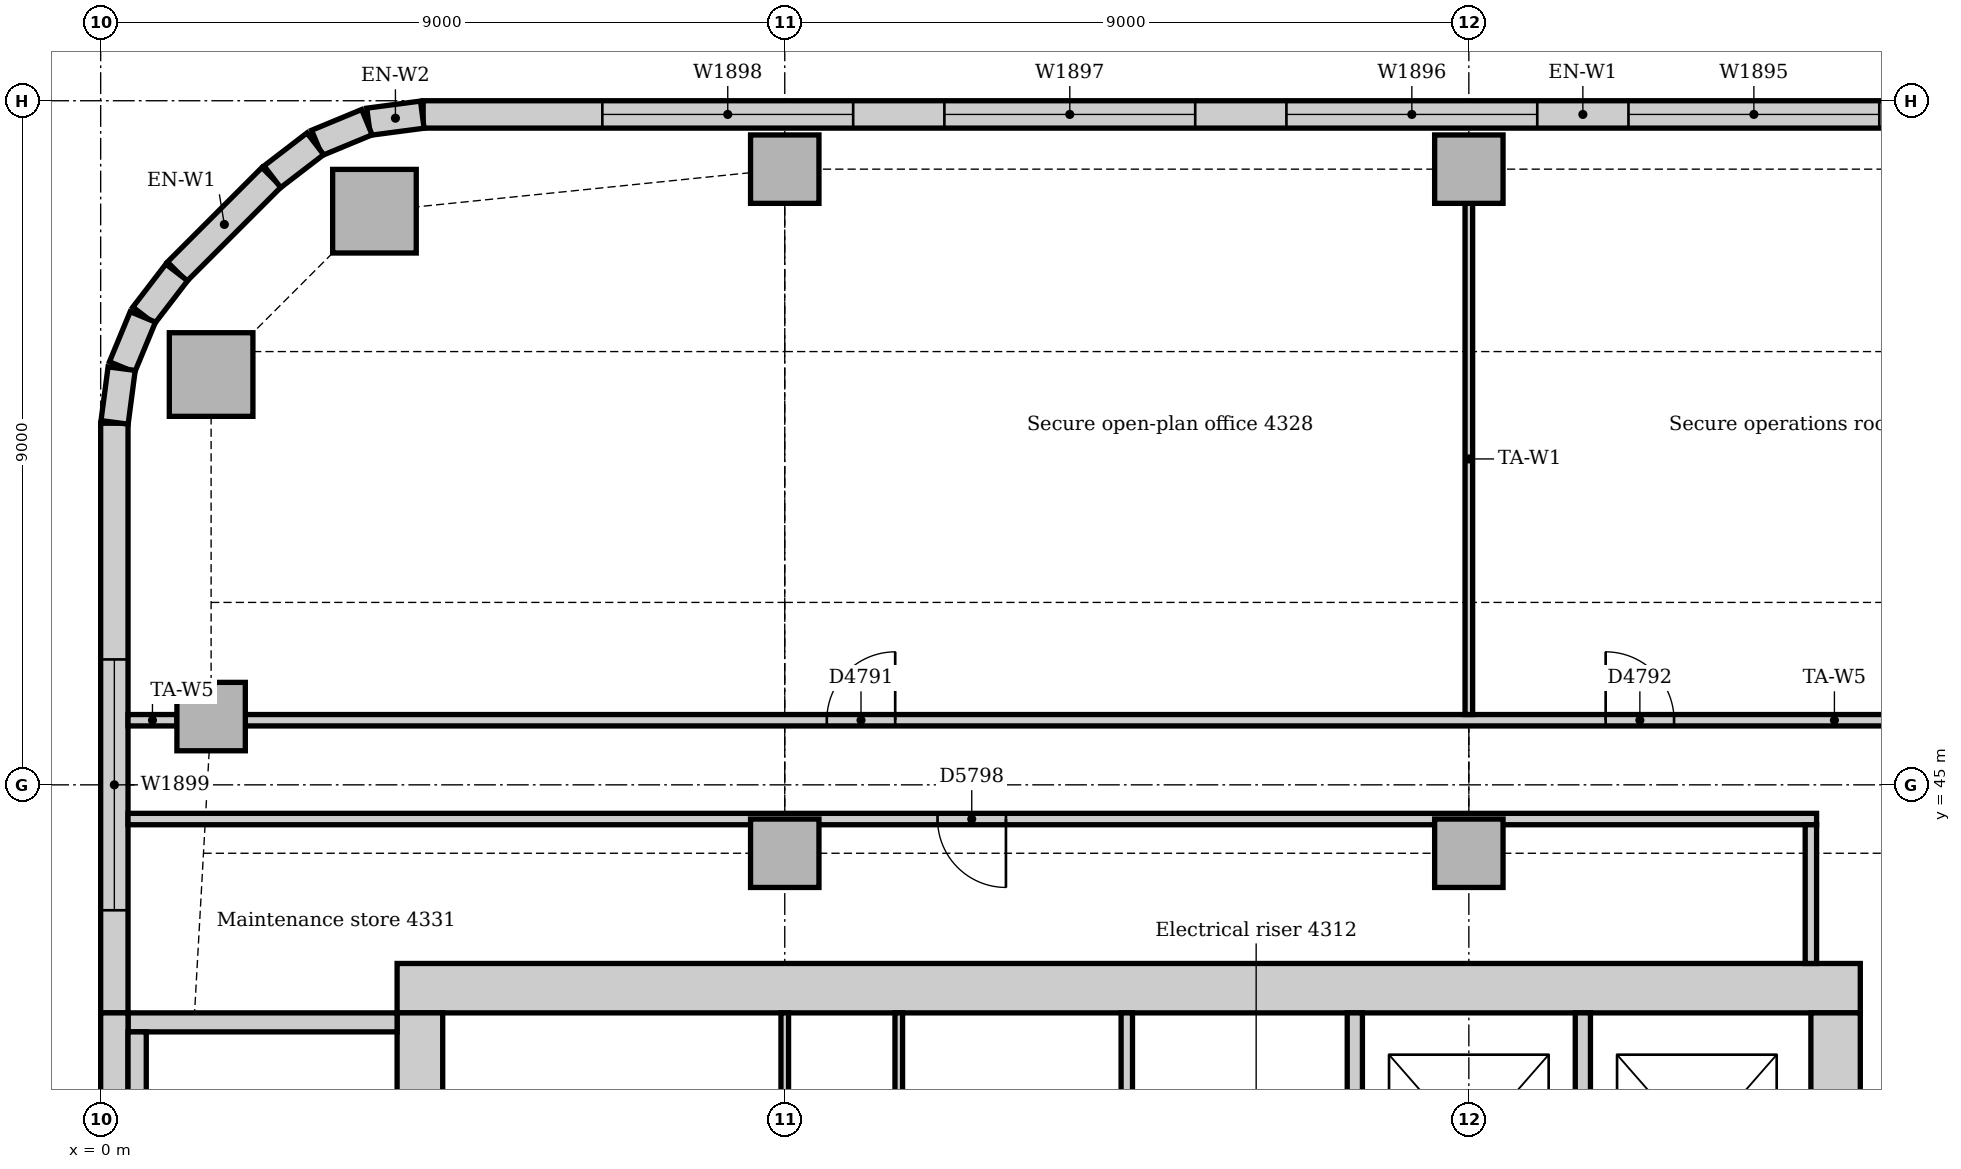
"""IFC4 building model, lengths in metres.
Left out: names, types, materials, properties, quantities, classifications, styles, units other than length and angle.
Written with IfcOpenShell. Run it as: python <this file> out.ifc"""

import sys

from ifc_helpers import new_model, si_unit, direction, frame, frame_2d, origin, origin_2d, place, context, subcontext, project, spatial, rectangle, extrude, element, fill, save


model = new_model("IFC4")
c1 = context("Model", 3, precision=1e-05, world=origin(), true_north=direction((0.0, 1.0)))
c2 = subcontext(c1, "Body", "Model", "MODEL_VIEW")
j1 = project(units=[si_unit("LENGTHUNIT", "METRE"), si_unit("PLANEANGLEUNIT", "RADIAN")], contexts=[c1])
p1 = place(None, origin())
s1 = spatial("IfcSite", under=j1, at=p1, CompositionType="ELEMENT")
p2 = place(p1, origin())
s2 = spatial("IfcBuilding", under=s1, at=p2, CompositionType="ELEMENT")
p3 = place(p2, frame((0.0, 0.0, 181.0)))
s3 = spatial("IfcBuildingStorey", under=s2, at=p3, CompositionType="ELEMENT", Elevation=181.0)
p4 = place(p3, frame((23.15, 42.325, 0.0), z_axis=(0.0, 0.0, 1.0), x_axis=(-1.0, 0.0, 0.0)))
e1 = element("IfcWall", 1, at=p4, inside=s3, PredefinedType="SOLIDWALL", context=c2, shape_type="SweptSolid", body=[
    extrude(rectangle(XDim=19.25, YDim=0.65, at=frame_2d((9.625, 0.0))), origin(), (0.0, 0.0, 1.0), 4.0),
])
p5 = place(p3, frame((22.825, 31.5, 0.0), z_axis=(0.0, 0.0, 1.0), x_axis=(0.0, 1.0, 0.0)))
e2 = element("IfcWall", 2, at=p5, inside=s3, PredefinedType="SOLIDWALL", context=c2, shape_type="SweptSolid", body=[
    extrude(rectangle(XDim=10.5, YDim=0.65, at=frame_2d((5.25, 0.0))), origin(), (0.0, 0.0, 1.0), 4.0),
])
p6 = place(p5, frame((3.15, 0.0, 0.0)))
e3 = element("IfcOpeningElement", 3, at=p6, cuts=e2, PredefinedType="OPENING", context=c2, shape_type="SweptSolid", body=[
    extrude(rectangle(XDim=1.0, YDim=2.1, at=frame_2d((0.5, 1.05))), frame((0.0, 0.335, 0.0), z_axis=(0.0, -1.0, 0.0), x_axis=(1.0, 0.0, 0.0)), (0.0, 0.0, 1.0), 0.67),
])
p7 = place(p5, frame((5.2, 0.0, 0.0)))
e4 = element("IfcOpeningElement", 4, at=p7, cuts=e2, PredefinedType="OPENING", context=c2, shape_type="SweptSolid", body=[
    extrude(rectangle(XDim=1.0, YDim=2.1, at=frame_2d((0.5, 1.05))), frame((0.0, 0.335, 0.0), z_axis=(0.0, -1.0, 0.0), x_axis=(1.0, 0.0, 0.0)), (0.0, 0.0, 1.0), 0.67),
])
p8 = place(p3, frame((4.2, 42.0, 0.0), z_axis=(0.0, 0.0, 1.0), x_axis=(0.0, -1.0, 0.0)))
e5 = element("IfcWall", 5, at=p8, inside=s3, PredefinedType="SOLIDWALL", context=c2, shape_type="SweptSolid", body=[
    extrude(rectangle(XDim=10.5, YDim=0.6, at=frame_2d((5.25, 0.0))), origin(), (0.0, 0.0, 1.0), 4.0),
])
p9 = place(p8, frame((5.3, 0.0, 0.0)))
e6 = element("IfcOpeningElement", 6, at=p9, cuts=e5, PredefinedType="OPENING", context=c2, shape_type="SweptSolid", body=[
    extrude(rectangle(XDim=1.0, YDim=2.1, at=frame_2d((0.5, 1.05))), frame((0.0, 0.31, 0.0), z_axis=(0.0, -1.0, 0.0), x_axis=(1.0, 0.0, 0.0)), (0.0, 0.0, 1.0), 0.62),
])
p10 = place(p3, frame((3.9, 41.875, 0.0), z_axis=(0.0, 0.0, 1.0), x_axis=(-1.0, 0.0, 0.0)))
e7 = element("IfcWall", 7, at=p10, inside=s3, PredefinedType="SOLIDWALL", context=c2, shape_type="SweptSolid", body=[
    extrude(rectangle(XDim=3.54, YDim=0.25, at=frame_2d((1.77, 0.0))), origin(), (0.0, 0.0, 1.0), 4.0),
])
for number, where, z_axis, x_axis in (
    (8, (3.602, 52.547, 0.0), (0.0, 0.0, 1.0), (1.0, 0.0, 0.0)),
    (9, (1.453, 50.398, 0.0), (0.0, 0.0, 1.0), (1.0, 0.0, 0.0)),
):
    element("IfcColumn", number, at=place(p3, frame(where, z_axis=z_axis, x_axis=x_axis)), inside=s3, PredefinedType="COLUMN", context=c2, shape_type="SweptSolid", body=[
        extrude(rectangle(XDim=1.1, YDim=1.1, at=origin_2d()), origin(), (0.0, 0.0, 1.0), 3.85),
    ])
for number, where, z_axis, x_axis in (
    (10, (9.0, 53.1, 0.0), (0.0, 0.0, 1.0), (1.0, 0.0, 0.0)),
    (11, (18.0, 53.1, 0.0), (0.0, 0.0, 1.0), (1.0, 0.0, 0.0)),
    (12, (1.453, 45.898, 0.0), (0.0, 0.0, 1.0), (1.0, 0.0, 0.0)),
    (13, (9.0, 44.1, 0.0), (0.0, 0.0, 1.0), (1.0, 0.0, 0.0)),
    (14, (18.0, 44.1, 0.0), (0.0, 0.0, 1.0), (1.0, 0.0, 0.0)),
):
    element("IfcColumn", number, at=place(p3, frame(where, z_axis=z_axis, x_axis=x_axis)), inside=s3, PredefinedType="COLUMN", context=c2, shape_type="SweptSolid", body=[
        extrude(rectangle(XDim=0.9, YDim=0.9, at=origin_2d()), origin(), (0.0, 0.0, 1.0), 3.85),
    ])
p11 = place(p3, frame((34.757, 53.82, 0.0), z_axis=(0.0, 0.0, 1.0), x_axis=(-1.0, 0.0, 0.0)))
e15 = element("IfcWall", 15, at=p11, inside=s3, PredefinedType="STANDARD", context=c2, shape_type="SweptSolid", body=[
    extrude(rectangle(XDim=30.515, YDim=0.36, at=frame_2d((15.257, 0.0))), origin(), (0.0, 0.0, 1.0), 3.85),
])
p12 = place(p11, frame((3.457, 0.0, 0.9)))
e16 = element("IfcOpeningElement", 16, at=p12, cuts=e15, PredefinedType="OPENING", context=c2, shape_type="SweptSolid", body=[
    extrude(rectangle(XDim=1.8, YDim=1.6, at=frame_2d((0.9, 0.8))), frame((0.0, 0.19, 0.0), z_axis=(0.0, -1.0, 0.0), x_axis=(1.0, 0.0, 0.0)), (0.0, 0.0, 1.0), 0.38),
])
p13 = place(p11, frame((6.857, 0.0, 0.9)))
e17 = element("IfcOpeningElement", 17, at=p13, cuts=e15, PredefinedType="OPENING", context=c2, shape_type="SweptSolid", body=[
    extrude(rectangle(XDim=3.3, YDim=1.6, at=frame_2d((1.65, 0.8))), frame((0.0, 0.19, 0.0), z_axis=(0.0, -1.0, 0.0), x_axis=(1.0, 0.0, 0.0)), (0.0, 0.0, 1.0), 0.38),
])
p14 = place(p11, frame((11.357, 0.0, 0.9)))
e18 = element("IfcOpeningElement", 18, at=p14, cuts=e15, PredefinedType="OPENING", context=c2, shape_type="SweptSolid", body=[
    extrude(rectangle(XDim=3.3, YDim=1.6, at=frame_2d((1.65, 0.8))), frame((0.0, 0.19, 0.0), z_axis=(0.0, -1.0, 0.0), x_axis=(1.0, 0.0, 0.0)), (0.0, 0.0, 1.0), 0.38),
])
p15 = place(p11, frame((15.857, 0.0, 0.9)))
e19 = element("IfcOpeningElement", 19, at=p15, cuts=e15, PredefinedType="OPENING", context=c2, shape_type="SweptSolid", body=[
    extrude(rectangle(XDim=3.3, YDim=1.6, at=frame_2d((1.65, 0.8))), frame((0.0, 0.19, 0.0), z_axis=(0.0, -1.0, 0.0), x_axis=(1.0, 0.0, 0.0)), (0.0, 0.0, 1.0), 0.38),
])
p16 = place(p11, frame((20.357, 0.0, 0.9)))
e20 = element("IfcOpeningElement", 20, at=p16, cuts=e15, PredefinedType="OPENING", context=c2, shape_type="SweptSolid", body=[
    extrude(rectangle(XDim=3.3, YDim=1.6, at=frame_2d((1.65, 0.8))), frame((0.0, 0.19, 0.0), z_axis=(0.0, -1.0, 0.0), x_axis=(1.0, 0.0, 0.0)), (0.0, 0.0, 1.0), 0.38),
])
p17 = place(p11, frame((24.857, 0.0, 0.9)))
e21 = element("IfcOpeningElement", 21, at=p17, cuts=e15, PredefinedType="OPENING", context=c2, shape_type="SweptSolid", body=[
    extrude(rectangle(XDim=3.3, YDim=1.6, at=frame_2d((1.65, 0.8))), frame((0.0, 0.19, 0.0), z_axis=(0.0, -1.0, 0.0), x_axis=(1.0, 0.0, 0.0)), (0.0, 0.0, 1.0), 0.38),
])
p18 = place(p3, frame((2.249, 52.994, 0.0), z_axis=(0.0, 0.0, 1.0), x_axis=(-0.707106781187, -0.707106781187, 0.0)))
e22 = element("IfcWall", 22, at=p18, inside=s3, PredefinedType="STANDARD", context=c2, shape_type="SweptSolid", body=[
    extrude(rectangle(XDim=1.757, YDim=0.36, at=frame_2d((0.879, 0.0))), origin(), (0.0, 0.0, 1.0), 3.85),
])
p19 = place(p3, frame((0.18, 49.757, 0.0), z_axis=(0.0, 0.0, 1.0), x_axis=(0.0, -1.0, 0.0)))
e23 = element("IfcWall", 23, at=p19, inside=s3, PredefinedType="STANDARD", context=c2, shape_type="SweptSolid", body=[
    extrude(rectangle(XDim=7.757, YDim=0.36, at=frame_2d((3.879, 0.0))), origin(), (0.0, 0.0, 1.0), 3.85),
])
p20 = place(p19, frame((3.107, 0.0, 0.9)))
e24 = element("IfcOpeningElement", 24, at=p20, cuts=e23, PredefinedType="OPENING", context=c2, shape_type="SweptSolid", body=[
    extrude(rectangle(XDim=3.3, YDim=1.6, at=frame_2d((1.65, 0.8))), frame((0.0, 0.19, 0.0), z_axis=(0.0, -1.0, 0.0), x_axis=(1.0, 0.0, 0.0)), (0.0, 0.0, 1.0), 0.38),
])
p21 = place(p3, frame((0.18, 42.0, 0.0), z_axis=(0.0, 0.0, 1.0), x_axis=(0.0, -1.0, 0.0)))
e25 = element("IfcWall", 25, at=p21, inside=s3, PredefinedType="STANDARD", context=c2, shape_type="SweptSolid", body=[
    extrude(rectangle(XDim=6.75, YDim=0.36, at=frame_2d((3.375, 0.0))), origin(), (0.0, 0.0, 1.0), 3.85),
])
for number, where, z_axis, x_axis in (
    (26, (4.231, 53.817, 0.0), (0.0, 0.0, 1.0), (-0.991, -0.131, 0.0)),
    (27, (3.503, 53.718, 0.0), (0.0, 0.0, 1.0), (-0.924, -0.383, 0.0)),
):
    element("IfcWall", number, at=place(p3, frame(where, z_axis=z_axis, x_axis=x_axis)), inside=s3, PredefinedType="STANDARD", context=c2, shape_type="SweptSolid", body=[
        extrude(rectangle(XDim=0.713, YDim=0.36, at=frame_2d((0.356, 0.0))), origin(), (0.0, 0.0, 1.0), 3.85),
    ])
for number, where, z_axis, x_axis in (
    (28, (2.825, 53.434, 0.0), (0.0, 0.0, 1.0), (-0.793, -0.609, 0.0)),
    (29, (1.0, 51.741, 0.0), (0.0, 0.0, 1.0), (-0.609, -0.793, 0.0)),
):
    element("IfcWall", number, at=place(p3, frame(where, z_axis=z_axis, x_axis=x_axis)), inside=s3, PredefinedType="STANDARD", context=c2, shape_type="SweptSolid", body=[
        extrude(rectangle(XDim=0.713, YDim=0.36, at=frame_2d((0.357, 0.0))), origin(), (0.0, 0.0, 1.0), 3.85),
    ])
for number, where, z_axis, x_axis in (
    (30, (0.555, 51.156, 0.0), (0.0, 0.0, 1.0), (-0.383, -0.924, 0.0)),
    (31, (0.276, 50.476, 0.0), (0.0, 0.0, 1.0), (-0.131, -0.991, 0.0)),
):
    element("IfcWall", number, at=place(p3, frame(where, z_axis=z_axis, x_axis=x_axis)), inside=s3, PredefinedType="STANDARD", context=c2, shape_type="SweptSolid", body=[
        extrude(rectangle(XDim=0.713, YDim=0.36, at=frame_2d((0.356, 0.0))), origin(), (0.0, 0.0, 1.0), 3.85),
    ])
p22 = place(p3, frame((0.48, 40.13, 0.0), z_axis=(0.0, 0.0, 1.0), x_axis=(0.0, 1.0, 0.0)))
e32 = element("IfcWall", 32, at=p22, inside=s3, PredefinedType="STANDARD", context=c2, shape_type="SweptSolid", body=[
    extrude(rectangle(XDim=1.62, YDim=0.24, at=frame_2d((0.81, 0.0))), origin(), (0.0, 0.0, 1.0), 4.0),
])
for number, where, z_axis, x_axis in (
    (33, (16.5, 38.6, 0.0), (0.0, 0.0, 1.0), (0.0, 1.0, 0.0)),
    (34, (19.5, 38.6, 0.0), (0.0, 0.0, 1.0), (0.0, 1.0, 0.0)),
):
    element("IfcWall", number, at=place(p3, frame(where, z_axis=z_axis, x_axis=x_axis)), inside=s3, PredefinedType="PARTITIONING", context=c2, shape_type="SweptSolid", body=[
        extrude(rectangle(XDim=3.4, YDim=0.2, at=frame_2d((1.7, 0.0))), origin(), (0.0, 0.0, 1.0), 3.85),
    ])
p23 = place(p3, frame((1.903, 45.85, 0.0), z_axis=(0.0, 0.0, 1.0), x_axis=(1.0, 0.0, 0.0)))
e35 = element("IfcWall", 35, at=p23, inside=s3, PredefinedType="PARTITIONING", context=c2, shape_type="SweptSolid", body=[
    extrude(rectangle(XDim=41.813, YDim=0.15, at=frame_2d((20.906, 0.0))), origin(), (0.0, 0.0, 1.0), 3.85),
])
p24 = place(p23, frame((7.65, 0.0, 0.0)))
e36 = element("IfcOpeningElement", 36, at=p24, cuts=e35, PredefinedType="OPENING", context=c2, shape_type="SweptSolid", body=[
    extrude(rectangle(XDim=0.9, YDim=2.1, at=frame_2d((0.45, 1.05))), frame((0.0, 0.085, 0.0), z_axis=(0.0, -1.0, 0.0), x_axis=(1.0, 0.0, 0.0)), (0.0, 0.0, 1.0), 0.17),
])
p25 = place(p23, frame((17.897, 0.0, 0.0)))
e37 = element("IfcOpeningElement", 37, at=p25, cuts=e35, PredefinedType="OPENING", context=c2, shape_type="SweptSolid", body=[
    extrude(rectangle(XDim=0.9, YDim=2.1, at=frame_2d((0.45, 1.05))), frame((0.0, 0.085, 0.0), z_axis=(0.0, -1.0, 0.0), x_axis=(1.0, 0.0, 0.0)), (0.0, 0.0, 1.0), 0.17),
])
p26 = place(p23, frame((35.197, 0.0, 0.0)))
e38 = element("IfcOpeningElement", 38, at=p26, cuts=e35, PredefinedType="OPENING", context=c2, shape_type="SweptSolid", body=[
    extrude(rectangle(XDim=0.9, YDim=2.1, at=frame_2d((0.45, 1.05))), frame((0.0, 0.085, 0.0), z_axis=(0.0, -1.0, 0.0), x_axis=(1.0, 0.0, 0.0)), (0.0, 0.0, 1.0), 0.17),
])
p27 = place(p3, frame((0.36, 45.85, 0.0), z_axis=(0.0, 0.0, 1.0), x_axis=(1.0, 0.0, 0.0)))
e39 = element("IfcWall", 39, at=p27, inside=s3, PredefinedType="PARTITIONING", context=c2, shape_type="SweptSolid", body=[
    extrude(rectangle(XDim=0.643, YDim=0.15, at=frame_2d((0.322, 0.0))), origin(), (0.0, 0.0, 1.0), 3.85),
])
p28 = place(p3, frame((0.36, 44.55, 0.0), z_axis=(0.0, 0.0, 1.0), x_axis=(1.0, 0.0, 0.0)))
e40 = element("IfcWall", 40, at=p28, inside=s3, PredefinedType="PARTITIONING", context=c2, shape_type="SweptSolid", body=[
    extrude(rectangle(XDim=22.215, YDim=0.15, at=frame_2d((11.107, 0.0))), origin(), (0.0, 0.0, 1.0), 3.85),
])
p29 = place(p28, frame((10.65, 0.0, 0.0)))
e41 = element("IfcOpeningElement", 41, at=p29, cuts=e40, PredefinedType="OPENING", context=c2, shape_type="SweptSolid", body=[
    extrude(rectangle(XDim=0.9, YDim=2.1, at=frame_2d((0.45, 1.05))), frame((0.0, 0.085, 0.0), z_axis=(0.0, -1.0, 0.0), x_axis=(1.0, 0.0, 0.0)), (0.0, 0.0, 1.0), 0.17),
])
p30 = place(p3, frame((22.5, 42.65, 0.0), z_axis=(0.0, 0.0, 1.0), x_axis=(0.0, 1.0, 0.0)))
e42 = element("IfcWall", 42, at=p30, inside=s3, PredefinedType="PARTITIONING", context=c2, shape_type="SweptSolid", body=[
    extrude(rectangle(XDim=1.825, YDim=0.15, at=frame_2d((0.912, 0.0))), origin(), (0.0, 0.0, 1.0), 3.85),
])
p31 = place(p3, frame((13.5, 38.575, 0.0), z_axis=(0.0, 0.0, 1.0), x_axis=(0.0, 1.0, 0.0)))
e43 = element("IfcWall", 43, at=p31, inside=s3, PredefinedType="PARTITIONING", context=c2, shape_type="SweptSolid", body=[
    extrude(rectangle(XDim=3.425, YDim=0.15, at=frame_2d((1.712, 0.0))), origin(), (0.0, 0.0, 1.0), 3.85),
])
p32 = place(p3, frame((18.0, 45.925, 0.0), z_axis=(0.0, 0.0, 1.0), x_axis=(0.0, 1.0, 0.0)))
e44 = element("IfcWall", 44, at=p32, inside=s3, PredefinedType="PARTITIONING", context=c2, shape_type="SweptSolid", body=[
    extrude(rectangle(XDim=6.725, YDim=0.1, at=frame_2d((3.362, 0.0))), origin(), (0.0, 0.0, 1.0), 3.362),
])
for number, where, z_axis, x_axis in (
    (45, (9.0, 38.575, 0.0), (0.0, 0.0, 1.0), (0.0, 1.0, 0.0)),
    (46, (10.5, 38.575, 0.0), (0.0, 0.0, 1.0), (0.0, 1.0, 0.0)),
):
    element("IfcWall", number, at=place(p3, frame(where, z_axis=z_axis, x_axis=x_axis)), inside=s3, PredefinedType="PARTITIONING", context=c2, shape_type="SweptSolid", body=[
        extrude(rectangle(XDim=3.425, YDim=0.1, at=frame_2d((1.712, 0.0))), origin(), (0.0, 0.0, 1.0), 3.85),
    ])
p33 = place(p14, origin())
e47 = element("IfcWindow", 47, at=p33, inside=s3, PartitioningType="SINGLE_PANEL", PredefinedType="WINDOW", context=c2, shape_type="SweptSolid", body=[
    extrude(rectangle(XDim=3.3, YDim=1.6, at=frame_2d((1.65, 0.8))), frame((0.0, 0.13, 0.0), z_axis=(0.0, -1.0, 0.0), x_axis=(1.0, 0.0, 0.0)), (0.0, 0.0, 1.0), 0.06),
])
fill(e18, e47)
p34 = place(p15, origin())
e48 = element("IfcWindow", 48, at=p34, inside=s3, PartitioningType="SINGLE_PANEL", PredefinedType="WINDOW", context=c2, shape_type="SweptSolid", body=[
    extrude(rectangle(XDim=3.3, YDim=1.6, at=frame_2d((1.65, 0.8))), frame((0.0, 0.13, 0.0), z_axis=(0.0, -1.0, 0.0), x_axis=(1.0, 0.0, 0.0)), (0.0, 0.0, 1.0), 0.06),
])
fill(e19, e48)
p35 = place(p16, origin())
e49 = element("IfcWindow", 49, at=p35, inside=s3, PartitioningType="SINGLE_PANEL", PredefinedType="WINDOW", context=c2, shape_type="SweptSolid", body=[
    extrude(rectangle(XDim=3.3, YDim=1.6, at=frame_2d((1.65, 0.8))), frame((0.0, 0.13, 0.0), z_axis=(0.0, -1.0, 0.0), x_axis=(1.0, 0.0, 0.0)), (0.0, 0.0, 1.0), 0.06),
])
fill(e20, e49)
p36 = place(p17, origin())
e50 = element("IfcWindow", 50, at=p36, inside=s3, PartitioningType="SINGLE_PANEL", PredefinedType="WINDOW", context=c2, shape_type="SweptSolid", body=[
    extrude(rectangle(XDim=3.3, YDim=1.6, at=frame_2d((1.65, 0.8))), frame((0.0, 0.13, 0.0), z_axis=(0.0, -1.0, 0.0), x_axis=(1.0, 0.0, 0.0)), (0.0, 0.0, 1.0), 0.06),
])
fill(e21, e50)
p37 = place(p20, origin())
e51 = element("IfcWindow", 51, at=p37, inside=s3, PartitioningType="SINGLE_PANEL", PredefinedType="WINDOW", context=c2, shape_type="SweptSolid", body=[
    extrude(rectangle(XDim=3.3, YDim=1.6, at=frame_2d((1.65, 0.8))), frame((0.0, 0.13, 0.0), z_axis=(0.0, -1.0, 0.0), x_axis=(1.0, 0.0, 0.0)), (0.0, 0.0, 1.0), 0.06),
])
fill(e24, e51)
p38 = place(p24, origin())
e52 = element("IfcDoor", 52, at=p38, inside=s3, OperationType="SINGLE_SWING_RIGHT", PredefinedType="DOOR", context=c2, shape_type="SweptSolid", body=[
    extrude(rectangle(XDim=0.9, YDim=2.1, at=frame_2d((0.45, 1.05))), frame((0.0, 0.025, 0.0), z_axis=(0.0, -1.0, 0.0), x_axis=(1.0, 0.0, 0.0)), (0.0, 0.0, 1.0), 0.05),
])
fill(e36, e52)
p39 = place(p25, origin())
e53 = element("IfcDoor", 53, at=p39, inside=s3, OperationType="SINGLE_SWING_LEFT", PredefinedType="DOOR", context=c2, shape_type="SweptSolid", body=[
    extrude(rectangle(XDim=0.9, YDim=2.1, at=frame_2d((0.45, 1.05))), frame((0.0, 0.025, 0.0), z_axis=(0.0, -1.0, 0.0), x_axis=(1.0, 0.0, 0.0)), (0.0, 0.0, 1.0), 0.05),
])
fill(e37, e53)
p40 = place(p29, frame((0.9, 0.0, 0.0), z_axis=(0.0, 0.0, 1.0), x_axis=(-1.0, 0.0, 0.0)))
e54 = element("IfcDoor", 54, at=p40, inside=s3, OperationType="SINGLE_SWING_LEFT", PredefinedType="DOOR", context=c2, shape_type="SweptSolid", body=[
    extrude(rectangle(XDim=0.9, YDim=2.1, at=frame_2d((0.45, 1.05))), frame((0.0, 0.025, 0.0), z_axis=(0.0, -1.0, 0.0), x_axis=(1.0, 0.0, 0.0)), (0.0, 0.0, 1.0), 0.05),
])
fill(e41, e54)
save(model, sys.argv[1])
